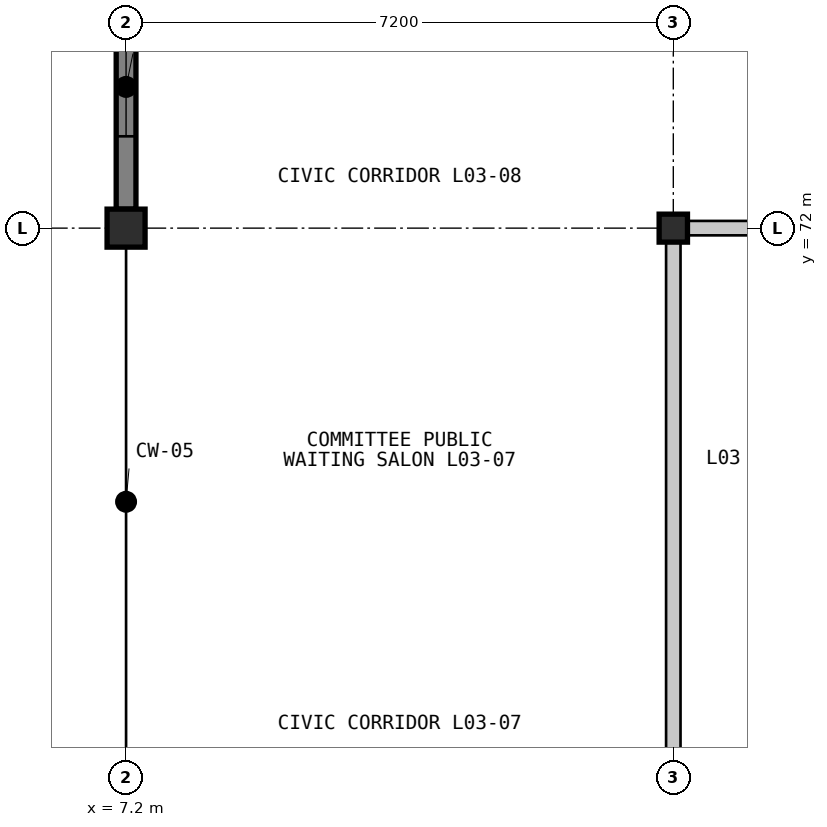
"""IFC4 building model, lengths in metres.
Left out: names, types, materials, properties, quantities, classifications, styles, units other than length and angle.
Written with IfcOpenShell. Run it as: python <this file> out.ifc"""

import sys

from ifc_helpers import new_model, si_unit, direction, frame, frame_2d, origin, origin_2d, place, context, subcontext, project, spatial, rectangle, i_section, extrude, element, fill, save


model = new_model("IFC4")
c1 = context("Model", 3, precision=1e-05, world=origin(), true_north=direction((0.0, 1.0)))
c2 = subcontext(c1, "Body", "Model", "MODEL_VIEW")
j1 = project(units=[si_unit("LENGTHUNIT", "METRE"), si_unit("PLANEANGLEUNIT", "RADIAN")], contexts=[c1])
p1 = place(None, origin())
s1 = spatial("IfcSite", under=j1, at=p1, CompositionType="ELEMENT")
p2 = place(p1, origin())
s2 = spatial("IfcBuilding", under=s1, at=p2, CompositionType="ELEMENT")
p3 = place(p2, frame((0.0, 0.0, 9.9)))
s3 = spatial("IfcBuildingStorey", under=s2, at=p3, CompositionType="ELEMENT", Elevation=9.9)
p4 = place(p3, frame((7.2, 72.0, 0.0), z_axis=(0.0, 0.0, 1.0), x_axis=(1.0, 0.0, 0.0)))
e1 = element("IfcColumn", 1, at=p4, inside=s3, PredefinedType="COLUMN", context=c2, shape_type="SweptSolid", body=[
    extrude(rectangle(XDim=0.5, YDim=0.5, at=origin_2d()), origin(), (0.0, 0.0, 1.0), 4.2),
])
p5 = place(p3, frame((14.4, 72.0, 0.0), z_axis=(0.0, 0.0, 1.0), x_axis=(1.0, 0.0, 0.0)))
e2 = element("IfcColumn", 2, at=p5, inside=s3, PredefinedType="COLUMN", context=c2, shape_type="SweptSolid", body=[
    extrude(i_section(OverallWidth=0.373, OverallDepth=0.368, WebThickness=0.015, FlangeThickness=0.024, FilletRadius=0.015, at=origin_2d()), origin(), (0.0, 0.0, 1.0), 4.2),
])
p6 = place(p3, frame((7.2, 72.25, 0.0), z_axis=(0.0, 0.0, 1.0), x_axis=(0.0, 1.0, 0.0)))
e3 = element("IfcWall", 3, at=p6, inside=s3, PredefinedType="SOLIDWALL", context=c2, shape_type="SweptSolid", body=[
    extrude(rectangle(XDim=6.7, YDim=0.26, at=frame_2d((3.35, 0.0))), origin(), (0.0, 0.0, 1.0), 3.487),
])
p7 = place(p6, frame((0.958, 0.0, 0.95)))
e4 = element("IfcOpeningElement", 4, at=p7, cuts=e3, PredefinedType="OPENING", context=c2, shape_type="SweptSolid", body=[
    extrude(rectangle(XDim=1.3, YDim=2.0, at=frame_2d((0.65, 1.0))), frame((0.0, 0.14, 0.0), z_axis=(0.0, -1.0, 0.0), x_axis=(1.0, 0.0, 0.0)), (0.0, 0.0, 1.0), 0.28),
])
p8 = place(p6, frame((4.442, 0.0, 0.95)))
e5 = element("IfcOpeningElement", 5, at=p8, cuts=e3, PredefinedType="OPENING", context=c2, shape_type="SweptSolid", body=[
    extrude(rectangle(XDim=1.3, YDim=2.0, at=frame_2d((0.65, 1.0))), frame((0.0, 0.14, 0.0), z_axis=(0.0, -1.0, 0.0), x_axis=(1.0, 0.0, 0.0)), (0.0, 0.0, 1.0), 0.28),
])
p9 = place(p3, frame((14.52, 72.0, 0.0), z_axis=(0.0, 0.0, 1.0), x_axis=(1.0, 0.0, 0.0)))
e6 = element("IfcWall", 6, at=p9, inside=s3, PredefinedType="PARTITIONING", context=c2, shape_type="SweptSolid", body=[
    extrude(rectangle(XDim=2.76, YDim=0.19, at=frame_2d((1.38, 0.0))), origin(), (0.0, 0.0, 1.0), 3.408),
])
p10 = place(p3, frame((14.4, 64.92, 0.0), z_axis=(0.0, 0.0, 1.0), x_axis=(0.0, 1.0, 0.0)))
e7 = element("IfcWall", 7, at=p10, inside=s3, PredefinedType="PARTITIONING", context=c2, shape_type="SweptSolid", body=[
    extrude(rectangle(XDim=6.96, YDim=0.19, at=frame_2d((3.48, 0.0))), origin(), (0.0, 0.0, 1.0), 3.408),
])
p11 = place(p7, origin())
e8 = element("IfcWindow", 8, at=p11, inside=s3, PartitioningType="SINGLE_PANEL", PredefinedType="WINDOW", context=c2, shape_type="SweptSolid", body=[
    extrude(rectangle(XDim=1.3, YDim=2.0, at=frame_2d((0.65, 1.0))), frame((0.0, 0.03, 0.0), z_axis=(0.0, -1.0, 0.0), x_axis=(1.0, 0.0, 0.0)), (0.0, 0.0, 1.0), 0.06),
])
fill(e4, e8)
save(model, sys.argv[1])
